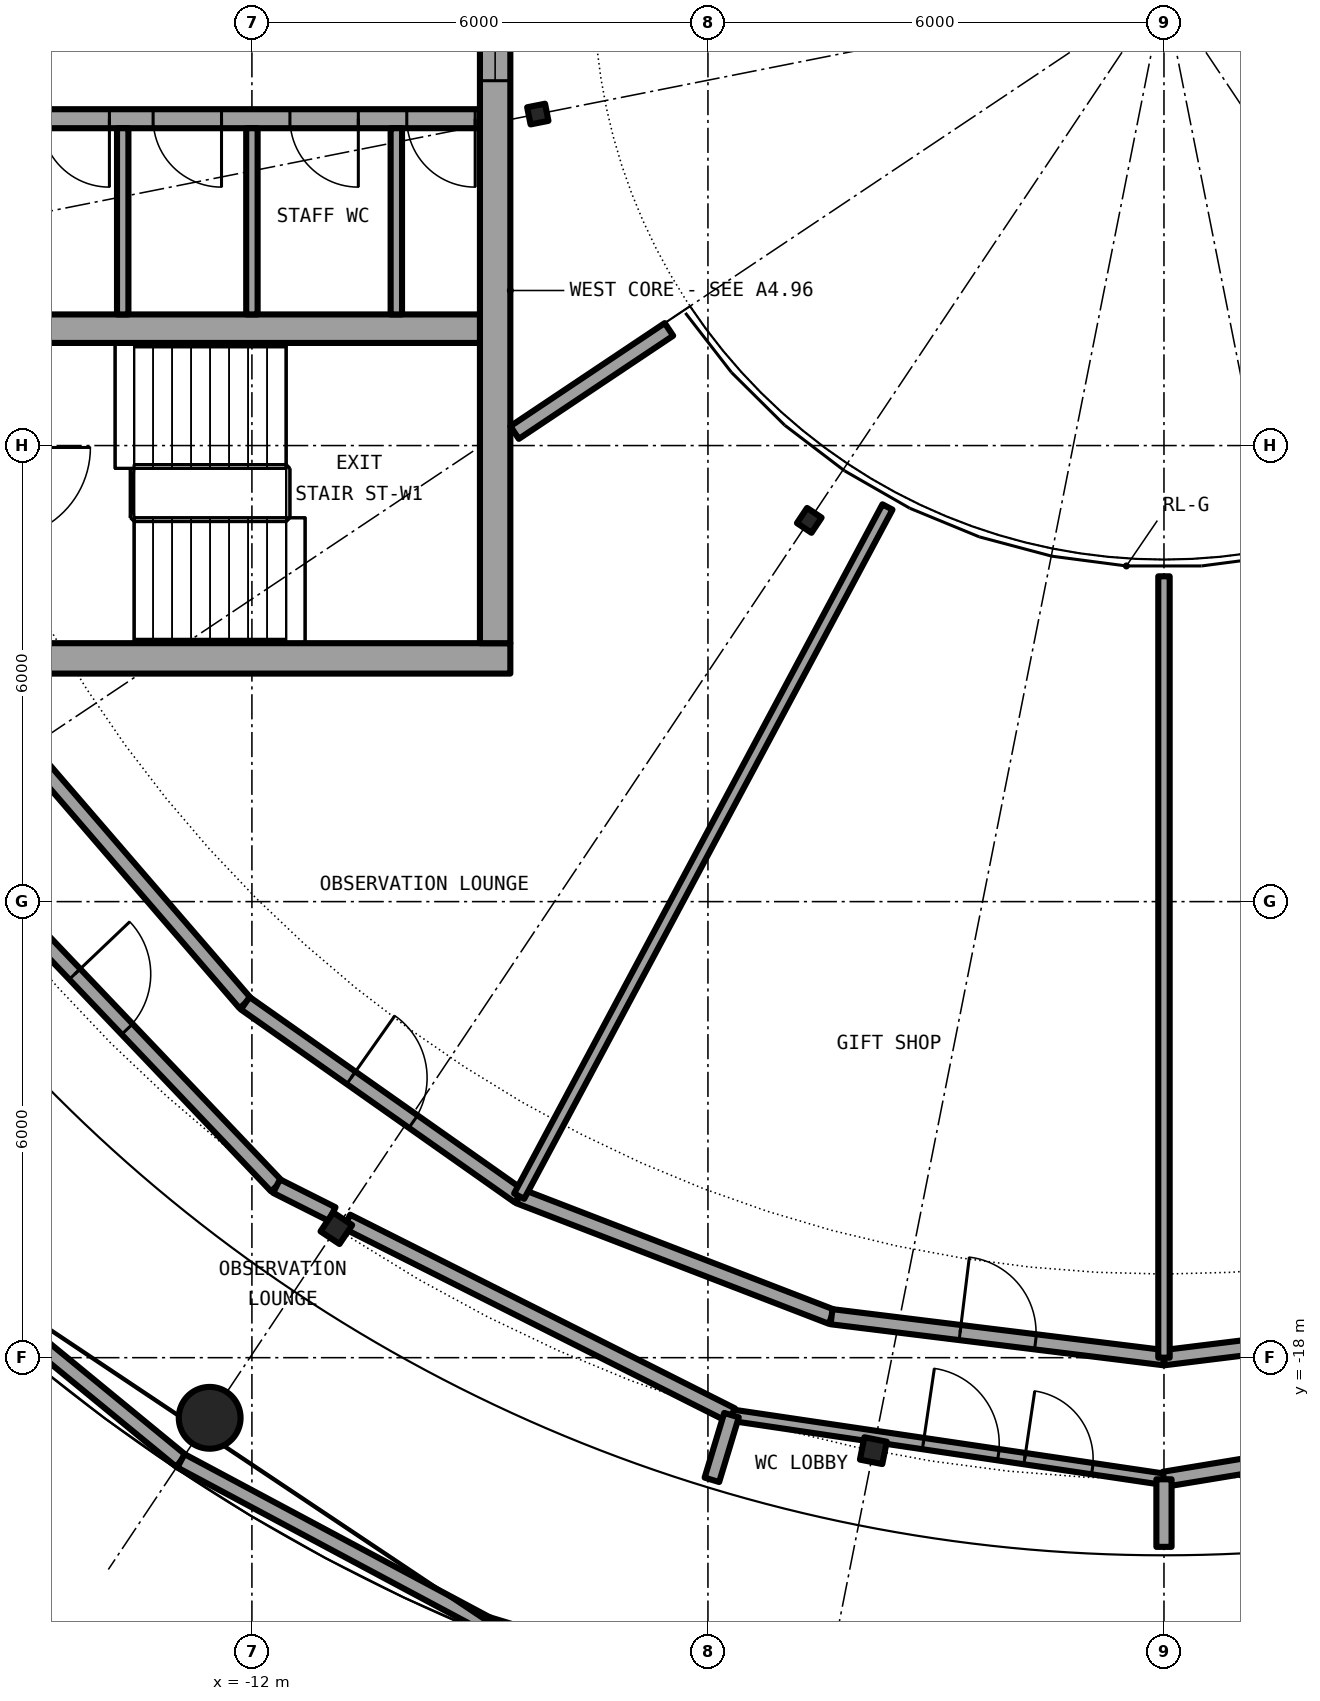
"""IFC4 building model, lengths in metres.
Left out: names, types, materials, properties, quantities, classifications, styles, units other than length and angle.
Written with IfcOpenShell. Run it as: python <this file> out.ifc"""

import sys

from ifc_helpers import new_model, si_unit, direction, frame, frame_2d, origin, origin_2d, place, context, subcontext, project, spatial, rectangle, hollow_circle, i_section, extrude, element, fill, save


model = new_model("IFC4")
c1 = context("Model", 3, precision=1e-05, world=origin(), true_north=direction((0.0, 1.0)))
c2 = subcontext(c1, "Body", "Model", "MODEL_VIEW")
j1 = project(units=[si_unit("LENGTHUNIT", "METRE"), si_unit("PLANEANGLEUNIT", "RADIAN")], contexts=[c1])
p1 = place(None, origin())
s1 = spatial("IfcSite", under=j1, at=p1, CompositionType="ELEMENT")
p2 = place(p1, origin())
s2 = spatial("IfcBuilding", under=s1, at=p2, CompositionType="ELEMENT")
p3 = place(p2, frame((0.0, 0.0, 255.4)))
s3 = spatial("IfcBuildingStorey", under=s2, at=p3, CompositionType="ELEMENT", Elevation=255.4)
p4 = place(p3, frame((-12.556, -18.791, 0.0), z_axis=(0.0, 0.0, 1.0), x_axis=(1.0, 0.0, 0.0)))
e1 = element("IfcColumn", 1, at=p4, inside=s3, PredefinedType="COLUMN", context=c2, shape_type="SweptSolid", body=[
    extrude(hollow_circle(Radius=0.406, WallThickness=0.03, at=origin_2d()), origin(), (0.0, 0.0, 1.0), 6.1),
])
for number, where, z_axis, x_axis in (
    (2, (-10.889, -16.297, 0.0), (0.0, 0.0, 1.0), (-0.556, -0.831, 0.0)),
    (3, (-3.824, -19.223, 0.0), (0.0, 0.0, 1.0), (-0.195, -0.981, 0.0)),
):
    element("IfcColumn", number, at=place(p3, frame(where, z_axis=z_axis, x_axis=x_axis)), inside=s3, PredefinedType="COLUMN", context=c2, shape_type="SweptSolid", body=[
        extrude(i_section(OverallWidth=0.3, OverallDepth=0.3, WebThickness=0.011, FlangeThickness=0.019, FilletRadius=0.027, at=origin_2d()), origin(), (0.0, 0.0, 1.0), 6.1),
    ])
for number, where, z_axis, x_axis in (
    (4, (-8.239, -1.639, 0.0), (0.0, 0.0, 1.0), (-0.981, -0.195, 0.0)),
    (5, (-4.667, -6.984, 0.0), (0.0, 0.0, 1.0), (-0.556, -0.831, 0.0)),
):
    element("IfcColumn", number, at=place(p3, frame(where, z_axis=z_axis, x_axis=x_axis)), inside=s3, PredefinedType="COLUMN", context=c2, shape_type="SweptSolid", body=[
        extrude(i_section(OverallWidth=0.24, OverallDepth=0.23, WebThickness=0.008, FlangeThickness=0.012, FilletRadius=0.021, at=origin_2d()), origin(), (0.0, 0.0, 1.0), 6.1),
    ])
p5 = place(p3, frame((-16.461, -16.461, 6.1), z_axis=(0.0, 0.0, 1.0), x_axis=(0.772840573317, -0.6346002271, 0.0)))
e6 = element("IfcWall", 6, at=p5, inside=s3, PredefinedType="PARAPET", context=c2, shape_type="SweptSolid", body=[
    extrude(rectangle(XDim=4.563, YDim=0.2, at=frame_2d((2.282, 0.0))), origin(), (0.0, 0.0, 1.0), 1.1),
])
p6 = place(p3, frame((-12.934, -19.357, 6.1), z_axis=(0.0, 0.0, 1.0), x_axis=(0.881954289711, -0.471334945511, 0.0)))
e7 = element("IfcWall", 7, at=p6, inside=s3, PredefinedType="PARAPET", context=c2, shape_type="SweptSolid", body=[
    extrude(rectangle(XDim=4.564, YDim=0.2, at=frame_2d((2.282, 0.0))), origin(), (0.0, 0.0, 1.0), 1.1),
])
p7 = place(p3, frame((-8.909, -21.508, 6.1), z_axis=(0.0, 0.0, 1.0), x_axis=(0.956924910545, -0.29033552242, 0.0)))
e8 = element("IfcWall", 8, at=p7, inside=s3, PredefinedType="PARAPET", context=c2, shape_type="SweptSolid", body=[
    extrude(rectangle(XDim=4.563, YDim=0.2, at=frame_2d((2.282, 0.0))), origin(), (0.0, 0.0, 1.0), 1.1),
])
p8 = place(p3, frame((-21.1, -8.8, 0.0), z_axis=(0.0, 0.0, 1.0), x_axis=(1.0, 0.0, 0.0)))
e9 = element("IfcWall", 9, at=p8, inside=s3, PredefinedType="SHEAR", context=c2, shape_type="SweptSolid", body=[
    extrude(rectangle(XDim=12.5, YDim=0.4, at=frame_2d((6.25, 0.0))), origin(), (0.0, 0.0, 1.0), 6.1),
])
p9 = place(p8, frame((0.475, 0.0, 0.0)))
e10 = element("IfcOpeningElement", 10, at=p9, cuts=e9, PredefinedType="OPENING", context=c2, shape_type="SweptSolid", body=[
    extrude(rectangle(XDim=1.2, YDim=2.3, at=frame_2d((0.6, 1.15))), frame((0.0, 0.21, 0.0), z_axis=(0.0, -1.0, 0.0), x_axis=(1.0, 0.0, 0.0)), (0.0, 0.0, 1.0), 0.42),
])
p10 = place(p3, frame((-8.8, 8.6, 0.0), z_axis=(0.0, 0.0, 1.0), x_axis=(0.0, -1.0, 0.0)))
e11 = element("IfcWall", 11, at=p10, inside=s3, PredefinedType="SHEAR", context=c2, shape_type="SweptSolid", body=[
    extrude(rectangle(XDim=17.2, YDim=0.4, at=frame_2d((8.6, 0.0))), origin(), (0.0, 0.0, 1.0), 6.1),
])
p11 = place(p10, frame((7.4, 0.0, 0.1)))
e12 = element("IfcOpeningElement", 12, at=p11, cuts=e11, PredefinedType="OPENING", context=c2, shape_type="SweptSolid", body=[
    extrude(rectangle(XDim=2.4, YDim=2.2, at=frame_2d((1.2, 1.1))), frame((0.0, 0.21, 0.0), z_axis=(0.0, -1.0, 0.0), x_axis=(1.0, 0.0, 0.0)), (0.0, 0.0, 1.0), 0.42),
])
p12 = place(p3, frame((-9.0, -1.7, 0.0), z_axis=(0.0, 0.0, 1.0), x_axis=(-1.0, 0.0, 0.0)))
e13 = element("IfcWall", 13, at=p12, inside=s3, PredefinedType="SHEAR", context=c2, shape_type="SweptSolid", body=[
    extrude(rectangle(XDim=10.15, YDim=0.25, at=frame_2d((5.075, 0.0))), origin(), (0.0, 0.0, 1.0), 6.1),
])
p13 = place(p12, frame((0.062, 0.0, 0.0)))
e14 = element("IfcOpeningElement", 14, at=p13, cuts=e13, PredefinedType="OPENING", context=c2, shape_type="SweptSolid", body=[
    extrude(rectangle(XDim=0.9, YDim=2.3, at=frame_2d((0.45, 1.15))), frame((0.0, 0.135, 0.0), z_axis=(0.0, -1.0, 0.0), x_axis=(1.0, 0.0, 0.0)), (0.0, 0.0, 1.0), 0.27),
])
p14 = place(p12, frame((1.6, 0.0, 0.0)))
e15 = element("IfcOpeningElement", 15, at=p14, cuts=e13, PredefinedType="OPENING", context=c2, shape_type="SweptSolid", body=[
    extrude(rectangle(XDim=0.9, YDim=2.3, at=frame_2d((0.45, 1.15))), frame((0.0, 0.135, 0.0), z_axis=(0.0, -1.0, 0.0), x_axis=(1.0, 0.0, 0.0)), (0.0, 0.0, 1.0), 0.27),
])
p15 = place(p12, frame((3.4, 0.0, 0.0)))
e16 = element("IfcOpeningElement", 16, at=p15, cuts=e13, PredefinedType="OPENING", context=c2, shape_type="SweptSolid", body=[
    extrude(rectangle(XDim=0.9, YDim=2.3, at=frame_2d((0.45, 1.15))), frame((0.0, 0.135, 0.0), z_axis=(0.0, -1.0, 0.0), x_axis=(1.0, 0.0, 0.0)), (0.0, 0.0, 1.0), 0.27),
])
p16 = place(p12, frame((4.875, 0.0, 0.0)))
e17 = element("IfcOpeningElement", 17, at=p16, cuts=e13, PredefinedType="OPENING", context=c2, shape_type="SweptSolid", body=[
    extrude(rectangle(XDim=0.9, YDim=2.3, at=frame_2d((0.45, 1.15))), frame((0.0, 0.135, 0.0), z_axis=(0.0, -1.0, 0.0), x_axis=(1.0, 0.0, 0.0)), (0.0, 0.0, 1.0), 0.27),
])
p17 = place(p12, frame((8.837, 0.0, 0.0)))
e18 = element("IfcOpeningElement", 18, at=p17, cuts=e13, PredefinedType="OPENING", context=c2, shape_type="SweptSolid", body=[
    extrude(rectangle(XDim=0.9, YDim=2.3, at=frame_2d((0.45, 1.15))), frame((0.0, 0.135, 0.0), z_axis=(0.0, -1.0, 0.0), x_axis=(1.0, 0.0, 0.0)), (0.0, 0.0, 1.0), 0.27),
])
p18 = place(p3, frame((-9.0, -4.462, 0.0), z_axis=(0.0, 0.0, 1.0), x_axis=(-1.0, 0.0, 0.0)))
e19 = element("IfcWall", 19, at=p18, inside=s3, PredefinedType="SHEAR", context=c2, shape_type="SweptSolid", body=[
    extrude(rectangle(XDim=10.15, YDim=0.375, at=frame_2d((5.075, 0.0))), origin(), (0.0, 0.0, 1.0), 6.1),
])
p19 = place(p18, frame((6.6, 0.0, 0.0)))
e20 = element("IfcOpeningElement", 20, at=p19, cuts=e19, PredefinedType="OPENING", context=c2, shape_type="SweptSolid", body=[
    extrude(rectangle(XDim=1.1, YDim=2.3, at=frame_2d((0.55, 1.15))), frame((0.0, 0.198, 0.0), z_axis=(0.0, -1.0, 0.0), x_axis=(1.0, 0.0, 0.0)), (0.0, 0.0, 1.0), 0.395),
])
for number, where, z_axis, x_axis in (
    (21, (-10.1, -1.825, 0.0), (0.0, 0.0, 1.0), (0.0, -1.0, 0.0)),
    (22, (-12.0, -1.825, 0.0), (0.0, 0.0, 1.0), (0.0, -1.0, 0.0)),
    (23, (-13.7, -1.825, 0.0), (0.0, 0.0, 1.0), (0.0, -1.0, 0.0)),
):
    element("IfcWall", number, at=place(p3, frame(where, z_axis=z_axis, x_axis=x_axis)), inside=s3, PredefinedType="PARTITIONING", context=c2, shape_type="SweptSolid", body=[
        extrude(rectangle(XDim=2.45, YDim=0.15, at=frame_2d((1.225, 0.0))), origin(), (0.0, 0.0, 1.0), 5.75),
    ])
p20 = place(p3, frame((-5.69, -18.756, 0.0), z_axis=(0.0, 0.0, 1.0), x_axis=(0.989177240103, -0.146725552177, 0.0)))
e24 = element("IfcWall", 24, at=p20, inside=s3, PredefinedType="PARTITIONING", context=c2, shape_type="SweptSolid", body=[
    extrude(rectangle(XDim=5.752, YDim=0.15, at=frame_2d((2.876, 0.0))), origin(), (0.0, 0.0, 1.0), 5.5),
])
p21 = place(p20, frame((2.55, 0.0, 0.0)))
e25 = element("IfcOpeningElement", 25, at=p21, cuts=e24, PredefinedType="OPENING", context=c2, shape_type="SweptSolid", body=[
    extrude(rectangle(XDim=1.0, YDim=2.3, at=frame_2d((0.5, 1.15))), frame((0.0, 0.085, 0.0), z_axis=(0.0, -1.0, 0.0), x_axis=(1.0, 0.0, 0.0)), (0.0, 0.0, 1.0), 0.17),
])
p22 = place(p20, frame((3.9, 0.0, 0.0)))
e26 = element("IfcOpeningElement", 26, at=p22, cuts=e24, PredefinedType="OPENING", context=c2, shape_type="SweptSolid", body=[
    extrude(rectangle(XDim=0.9, YDim=2.3, at=frame_2d((0.45, 1.15))), frame((0.0, 0.085, 0.0), z_axis=(0.0, -1.0, 0.0), x_axis=(1.0, 0.0, 0.0)), (0.0, 0.0, 1.0), 0.17),
])
p23 = place(p3, frame((0.0, -19.6, 0.0), z_axis=(0.0, 0.0, 1.0), x_axis=(0.986645929742, 0.162879738837, 0.0)))
e27 = element("IfcWall", 27, at=p23, inside=s3, PredefinedType="PARTITIONING", context=c2, shape_type="SweptSolid", body=[
    extrude(rectangle(XDim=6.385, YDim=0.2, at=frame_2d((3.193, 0.0))), origin(), (0.0, 0.0, 1.0), 5.5),
])
p24 = place(p3, frame((-16.192, -10.999, 0.0), z_axis=(0.0, 0.0, 1.0), x_axis=(0.689484820725, -0.724300132535, 0.0)))
e28 = element("IfcWall", 28, at=p24, inside=s3, PredefinedType="PARTITIONING", context=c2, shape_type="SweptSolid", body=[
    extrude(rectangle(XDim=6.55, YDim=0.2, at=frame_2d((3.275, 0.0))), origin(), (0.0, 0.0, 1.0), 5.5),
])
p25 = place(p24, frame((2.699, 0.0, 0.0)))
e29 = element("IfcOpeningElement", 29, at=p25, cuts=e28, PredefinedType="OPENING", context=c2, shape_type="SweptSolid", body=[
    extrude(rectangle(XDim=1.0, YDim=2.3, at=frame_2d((0.5, 1.15))), frame((0.0, 0.11, 0.0), z_axis=(0.0, -1.0, 0.0), x_axis=(1.0, 0.0, 0.0)), (0.0, 0.0, 1.0), 0.22),
])
p26 = place(p3, frame((-11.676, -15.743, 0.0), z_axis=(0.0, 0.0, 1.0), x_axis=(0.893110817984, -0.449836711263, 0.0)))
e30 = element("IfcWall", 30, at=p26, inside=s3, PredefinedType="PARTITIONING", context=c2, shape_type="SweptSolid", body=[
    extrude(rectangle(XDim=0.818, YDim=0.2, at=frame_2d((0.409, 0.0))), origin(), (0.0, 0.0, 1.0), 5.75),
])
p27 = place(p3, frame((-10.752, -16.208, 0.0), z_axis=(0.0, 0.0, 1.0), x_axis=(0.89321770158, -0.449624440599, 0.0)))
e31 = element("IfcWall", 31, at=p27, inside=s3, PredefinedType="PARTITIONING", context=c2, shape_type="SweptSolid", body=[
    extrude(rectangle(XDim=5.667, YDim=0.2, at=frame_2d((2.833, 0.0))), origin(), (0.0, 0.0, 1.0), 5.5),
])
p28 = place(p3, frame((-8.485, -15.875, 0.0), z_axis=(0.0, 0.0, 1.0), x_axis=(0.932983851272, -0.35991823136, 0.0)))
e32 = element("IfcWall", 32, at=p28, inside=s3, PredefinedType="PARTITIONING", context=c2, shape_type="SweptSolid", body=[
    extrude(rectangle(XDim=4.406, YDim=0.2, at=frame_2d((2.203, 0.0))), origin(), (0.0, 0.0, 1.0), 5.75),
])
p29 = place(p3, frame((-15.613, -9.25, 0.0), z_axis=(0.0, 0.0, 1.0), x_axis=(0.653146301984, -0.757231740093, 0.0)))
e33 = element("IfcWall", 33, at=p29, inside=s3, PredefinedType="PARTITIONING", context=c2, shape_type="SweptSolid", body=[
    extrude(rectangle(XDim=5.397, YDim=0.2, at=frame_2d((2.699, 0.0))), origin(), (0.0, 0.0, 1.0), 5.75),
])
p30 = place(p3, frame((-12.088, -13.337, 0.0), z_axis=(0.0, 0.0, 1.0), x_axis=(0.817507922666, -0.575917352038, 0.0)))
e34 = element("IfcWall", 34, at=p30, inside=s3, PredefinedType="PARTITIONING", context=c2, shape_type="SweptSolid", body=[
    extrude(rectangle(XDim=4.407, YDim=0.2, at=frame_2d((2.204, 0.0))), origin(), (0.0, 0.0, 1.0), 5.75),
])
p31 = place(p30, frame((1.704, 0.0, 0.0)))
e35 = element("IfcOpeningElement", 35, at=p31, cuts=e34, PredefinedType="OPENING", context=c2, shape_type="SweptSolid", body=[
    extrude(rectangle(XDim=1.0, YDim=2.3, at=frame_2d((0.5, 1.15))), frame((0.0, 0.11, 0.0), z_axis=(0.0, -1.0, 0.0), x_axis=(1.0, 0.0, 0.0)), (0.0, 0.0, 1.0), 0.22),
])
p32 = place(p3, frame((-4.374, -17.461, 0.0), z_axis=(0.0, 0.0, 1.0), x_axis=(0.992491158779, -0.122316391973, 0.0)))
e36 = element("IfcWall", 36, at=p32, inside=s3, PredefinedType="PARTITIONING", context=c2, shape_type="SweptSolid", body=[
    extrude(rectangle(XDim=4.407, YDim=0.2, at=frame_2d((2.204, 0.0))), origin(), (0.0, 0.0, 1.0), 5.75),
])
p33 = place(p32, frame((1.704, 0.0, 0.0)))
e37 = element("IfcOpeningElement", 37, at=p33, cuts=e36, PredefinedType="OPENING", context=c2, shape_type="SweptSolid", body=[
    extrude(rectangle(XDim=1.0, YDim=2.3, at=frame_2d((0.5, 1.15))), frame((0.0, 0.11, 0.0), z_axis=(0.0, -1.0, 0.0), x_axis=(1.0, 0.0, 0.0)), (0.0, 0.0, 1.0), 0.22),
])
p34 = place(p3, frame((0.0, -18.0, 0.0), z_axis=(0.0, 0.0, 1.0), x_axis=(0.992491158779, 0.122316391973, 0.0)))
e38 = element("IfcWall", 38, at=p34, inside=s3, PredefinedType="PARTITIONING", context=c2, shape_type="SweptSolid", body=[
    extrude(rectangle(XDim=4.407, YDim=0.2, at=frame_2d((2.204, 0.0))), origin(), (0.0, 0.0, 1.0), 5.75),
])
p35 = place(p34, frame((1.704, 0.0, 0.0)))
e39 = element("IfcOpeningElement", 39, at=p35, cuts=e38, PredefinedType="OPENING", context=c2, shape_type="SweptSolid", body=[
    extrude(rectangle(XDim=1.0, YDim=2.3, at=frame_2d((0.5, 1.15))), frame((0.0, 0.11, 0.0), z_axis=(0.0, -1.0, 0.0), x_axis=(1.0, 0.0, 0.0)), (0.0, 0.0, 1.0), 0.22),
])
p36 = place(p3, frame((-6.513, -4.472, 0.0), z_axis=(0.0, 0.0, 1.0), x_axis=(-0.831450132577, -0.555599385382, 0.0)))
e40 = element("IfcWall", 40, at=p36, inside=s3, PredefinedType="PARTITIONING", context=c2, shape_type="SweptSolid", body=[
    extrude(rectangle(XDim=2.443, YDim=0.2, at=frame_2d((1.221, 0.0))), origin(), (0.0, 0.0, 1.0), 5.75),
])
p37 = place(p3, frame((-8.484, -15.875, 0.0), z_axis=(0.0, 0.0, 1.0), x_axis=(0.471365806418, 0.881937796299, 0.0)))
e41 = element("IfcWall", 41, at=p37, inside=s3, PredefinedType="PARTITIONING", context=c2, shape_type="SweptSolid", body=[
    extrude(rectangle(XDim=10.281, YDim=0.15, at=frame_2d((5.14, 0.0))), origin(), (0.0, 0.0, 1.0), 5.75),
])
p38 = place(p3, frame((-5.948, -19.607, 0.0), z_axis=(0.0, 0.0, 1.0), x_axis=(0.290243641717, 0.956952782766, 0.0)))
e42 = element("IfcWall", 42, at=p38, inside=s3, PredefinedType="PARTITIONING", context=c2, shape_type="SweptSolid", body=[
    extrude(rectangle(XDim=0.889, YDim=0.2, at=frame_2d((0.445, 0.0))), origin(), (0.0, 0.0, 1.0), 5.75),
])
p39 = place(p3, frame((0.0, -20.489, 0.0), z_axis=(0.0, 0.0, 1.0), x_axis=(0.0, 1.0, 0.0)))
e43 = element("IfcWall", 43, at=p39, inside=s3, PredefinedType="PARTITIONING", context=c2, shape_type="SweptSolid", body=[
    extrude(rectangle(XDim=0.889, YDim=0.2, at=frame_2d((0.444, 0.0))), origin(), (0.0, 0.0, 1.0), 5.75),
])
p40 = place(p3, frame((0.0, -18.0, 0.0), z_axis=(0.0, 0.0, 1.0), x_axis=(0.0, 1.0, 0.0)))
e44 = element("IfcWall", 44, at=p40, inside=s3, PredefinedType="PARTITIONING", context=c2, shape_type="SweptSolid", body=[
    extrude(rectangle(XDim=10.28, YDim=0.15, at=frame_2d((5.14, 0.0))), origin(), (0.0, 0.0, 1.0), 5.75),
])
p41 = place(p3, frame((0.0, 0.0, 5.75)))
p42 = place(p41, frame((-11.075, -19.182, 0.0)))
p43 = place(p42, frame((0.0, 0.0, 0.3)))
e45 = element("IfcWindow", 45, at=p43, inside=s3, PartitioningType="SINGLE_PANEL", PredefinedType="SKYLIGHT", context=c2, shape_type="SweptSolid", body=[
    extrude(rectangle(XDim=1.0, YDim=1.0, at=origin_2d()), origin(), (0.0, 0.0, 1.0), 0.05),
])
p44 = place(p13, origin())
e46 = element("IfcDoor", 46, at=p44, inside=s3, OperationType="SINGLE_SWING_RIGHT", PredefinedType="DOOR", context=c2, shape_type="SweptSolid", body=[
    extrude(rectangle(XDim=0.9, YDim=2.3, at=frame_2d((0.45, 1.15))), frame((0.0, 0.025, 0.0), z_axis=(0.0, -1.0, 0.0), x_axis=(1.0, 0.0, 0.0)), (0.0, 0.0, 1.0), 0.05),
])
fill(e14, e46)
p45 = place(p14, origin())
e47 = element("IfcDoor", 47, at=p45, inside=s3, OperationType="SINGLE_SWING_RIGHT", PredefinedType="DOOR", context=c2, shape_type="SweptSolid", body=[
    extrude(rectangle(XDim=0.9, YDim=2.3, at=frame_2d((0.45, 1.15))), frame((0.0, 0.025, 0.0), z_axis=(0.0, -1.0, 0.0), x_axis=(1.0, 0.0, 0.0)), (0.0, 0.0, 1.0), 0.05),
])
fill(e15, e47)
p46 = place(p15, origin())
e48 = element("IfcDoor", 48, at=p46, inside=s3, OperationType="SINGLE_SWING_RIGHT", PredefinedType="DOOR", context=c2, shape_type="SweptSolid", body=[
    extrude(rectangle(XDim=0.9, YDim=2.3, at=frame_2d((0.45, 1.15))), frame((0.0, 0.025, 0.0), z_axis=(0.0, -1.0, 0.0), x_axis=(1.0, 0.0, 0.0)), (0.0, 0.0, 1.0), 0.05),
])
fill(e16, e48)
p47 = place(p16, origin())
e49 = element("IfcDoor", 49, at=p47, inside=s3, OperationType="SINGLE_SWING_LEFT", PredefinedType="DOOR", context=c2, shape_type="SweptSolid", body=[
    extrude(rectangle(XDim=0.9, YDim=2.3, at=frame_2d((0.45, 1.15))), frame((0.0, 0.025, 0.0), z_axis=(0.0, -1.0, 0.0), x_axis=(1.0, 0.0, 0.0)), (0.0, 0.0, 1.0), 0.05),
])
fill(e17, e49)
p48 = place(p11, origin())
e50 = element("IfcWindow", 50, at=p48, inside=s3, PartitioningType="SINGLE_PANEL", PredefinedType="WINDOW", context=c2, shape_type="SweptSolid", body=[
    extrude(rectangle(XDim=2.4, YDim=2.2, at=frame_2d((1.2, 1.1))), frame((0.0, 0.03, 0.0), z_axis=(0.0, -1.0, 0.0), x_axis=(1.0, 0.0, 0.0)), (0.0, 0.0, 1.0), 0.06),
])
fill(e12, e50)
p49 = place(p21, origin())
e51 = element("IfcDoor", 51, at=p49, inside=s3, OperationType="SINGLE_SWING_RIGHT", PredefinedType="DOOR", context=c2, shape_type="SweptSolid", body=[
    extrude(rectangle(XDim=1.0, YDim=2.3, at=frame_2d((0.5, 1.15))), frame((0.0, 0.025, 0.0), z_axis=(0.0, -1.0, 0.0), x_axis=(1.0, 0.0, 0.0)), (0.0, 0.0, 1.0), 0.05),
])
fill(e25, e51)
p50 = place(p25, origin())
e52 = element("IfcDoor", 52, at=p50, inside=s3, OperationType="SINGLE_SWING_LEFT", PredefinedType="DOOR", context=c2, shape_type="SweptSolid", body=[
    extrude(rectangle(XDim=1.0, YDim=2.3, at=frame_2d((0.5, 1.15))), frame((0.0, 0.025, 0.0), z_axis=(0.0, -1.0, 0.0), x_axis=(1.0, 0.0, 0.0)), (0.0, 0.0, 1.0), 0.05),
])
fill(e29, e52)
p51 = place(p31, origin())
e53 = element("IfcDoor", 53, at=p51, inside=s3, OperationType="SINGLE_SWING_RIGHT", PredefinedType="DOOR", context=c2, shape_type="SweptSolid", body=[
    extrude(rectangle(XDim=1.0, YDim=2.3, at=frame_2d((0.5, 1.15))), frame((0.0, 0.025, 0.0), z_axis=(0.0, -1.0, 0.0), x_axis=(1.0, 0.0, 0.0)), (0.0, 0.0, 1.0), 0.05),
])
fill(e35, e53)
p52 = place(p33, origin())
e54 = element("IfcDoor", 54, at=p52, inside=s3, OperationType="SINGLE_SWING_LEFT", PredefinedType="DOOR", context=c2, shape_type="SweptSolid", body=[
    extrude(rectangle(XDim=1.0, YDim=2.3, at=frame_2d((0.5, 1.15))), frame((0.0, 0.025, 0.0), z_axis=(0.0, -1.0, 0.0), x_axis=(1.0, 0.0, 0.0)), (0.0, 0.0, 1.0), 0.05),
])
fill(e37, e54)
p53 = place(p22, origin())
e55 = element("IfcDoor", 55, at=p53, inside=s3, OperationType="SINGLE_SWING_RIGHT", PredefinedType="DOOR", context=c2, shape_type="SweptSolid", body=[
    extrude(rectangle(XDim=0.9, YDim=2.3, at=frame_2d((0.45, 1.15))), frame((0.0, 0.025, 0.0), z_axis=(0.0, -1.0, 0.0), x_axis=(1.0, 0.0, 0.0)), (0.0, 0.0, 1.0), 0.05),
])
fill(e26, e55)
save(model, sys.argv[1])
